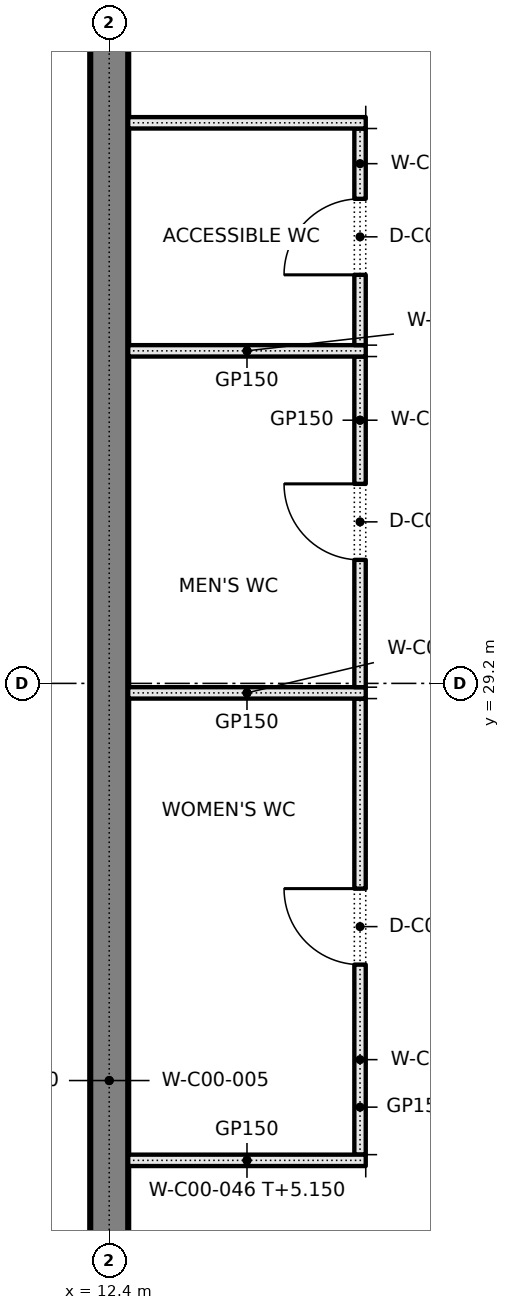
"""IFC4 building model, lengths in metres.
Left out: names, types, materials, properties, quantities, classifications, styles, units other than length and angle.
Written with IfcOpenShell. Run it as: python <this file> out.ifc"""

import sys

from ifc_helpers import new_model, si_unit, direction, frame, frame_2d, origin, place, context, subcontext, project, spatial, rectangle, extrude, element, fill, save


model = new_model("IFC4")
c1 = context("Model", 3, precision=1e-05, world=origin(), true_north=direction((0.0, 1.0)))
c2 = subcontext(c1, "Body", "Model", "MODEL_VIEW")
j1 = project(units=[si_unit("LENGTHUNIT", "METRE"), si_unit("PLANEANGLEUNIT", "RADIAN")], contexts=[c1])
p1 = place(None, origin())
s1 = spatial("IfcSite", under=j1, at=p1, CompositionType="ELEMENT")
p2 = place(p1, origin())
s2 = spatial("IfcBuilding", under=s1, at=p2, CompositionType="ELEMENT")
p3 = place(p2, origin())
s3 = spatial("IfcBuildingStorey", under=s2, at=p3, CompositionType="ELEMENT", Elevation=0.0)
p4 = place(p3, frame((12.4, 3.75, 0.0), z_axis=(0.0, 0.0, 1.0), x_axis=(0.0, 1.0, 0.0)))
e1 = element("IfcWall", 1, at=p4, inside=s3, PredefinedType="SOLIDWALL", context=c2, shape_type="SweptSolid", body=[
    extrude(rectangle(XDim=42.5, YDim=0.5, at=frame_2d((21.25, 0.0))), origin(), (0.0, 0.0, 1.0), 5.4),
])
p5 = place(p4, frame((40.45, 0.0, 0.0)))
e2 = element("IfcOpeningElement", 2, at=p5, cuts=e1, PredefinedType="OPENING", context=c2, shape_type="SweptSolid", body=[
    extrude(rectangle(XDim=1.5, YDim=2.1, at=frame_2d((0.75, 1.05))), frame((0.0, 0.26, 0.0), z_axis=(0.0, -1.0, 0.0), x_axis=(1.0, 0.0, 0.0)), (0.0, 0.0, 1.0), 0.52),
])
p6 = place(p3, frame((12.4, 3.77, -0.41), z_axis=(0.0, 0.0, 1.0), x_axis=(0.0, 1.0, 0.0)))
e3 = element("IfcWall", 3, at=p6, inside=s3, PredefinedType="SOLIDWALL", context=c2, shape_type="SweptSolid", body=[
    extrude(rectangle(XDim=42.46, YDim=0.5, at=frame_2d((21.23, 0.0))), origin(), (0.0, 0.0, 1.0), 0.41),
])
p7 = place(p3, frame((15.7, 23.0, 0.0), z_axis=(0.0, 0.0, 1.0), x_axis=(0.0, 1.0, 0.0)))
e4 = element("IfcWall", 4, at=p7, inside=s3, PredefinedType="PARTITIONING", context=c2, shape_type="SweptSolid", body=[
    extrude(rectangle(XDim=6.0, YDim=0.15, at=frame_2d((3.0, 0.0))), origin(), (0.0, 0.0, 1.0), 5.15),
])
p8 = place(p7, frame((2.5, 0.0, 0.0)))
e5 = element("IfcOpeningElement", 5, at=p8, cuts=e4, PredefinedType="OPENING", context=c2, shape_type="SweptSolid", body=[
    extrude(rectangle(XDim=1.0, YDim=2.1, at=frame_2d((0.5, 1.05))), frame((0.0, 0.085, 0.0), z_axis=(0.0, -1.0, 0.0), x_axis=(1.0, 0.0, 0.0)), (0.0, 0.0, 1.0), 0.17),
])
for number, where, z_axis, x_axis in (
    (6, (12.65, 22.925, 0.0), (0.0, 0.0, 1.0), (1.0, 0.0, 0.0)),
    (7, (12.65, 29.075, 0.0), (0.0, 0.0, 1.0), (1.0, 0.0, 0.0)),
):
    element("IfcWall", number, at=place(p3, frame(where, z_axis=z_axis, x_axis=x_axis)), inside=s3, PredefinedType="PARTITIONING", context=c2, shape_type="SweptSolid", body=[
        extrude(rectangle(XDim=3.125, YDim=0.15, at=frame_2d((1.562, 0.0))), origin(), (0.0, 0.0, 1.0), 5.15),
    ])
p9 = place(p3, frame((15.7, 29.15, 0.0), z_axis=(0.0, 0.0, 1.0), x_axis=(0.0, 1.0, 0.0)))
e8 = element("IfcWall", 8, at=p9, inside=s3, PredefinedType="PARTITIONING", context=c2, shape_type="SweptSolid", body=[
    extrude(rectangle(XDim=4.35, YDim=0.15, at=frame_2d((2.175, 0.0))), origin(), (0.0, 0.0, 1.0), 5.15),
])
p10 = place(p9, frame((1.675, 0.0, 0.0)))
e9 = element("IfcOpeningElement", 9, at=p10, cuts=e8, PredefinedType="OPENING", context=c2, shape_type="SweptSolid", body=[
    extrude(rectangle(XDim=1.0, YDim=2.1, at=frame_2d((0.5, 1.05))), frame((0.0, 0.085, 0.0), z_axis=(0.0, -1.0, 0.0), x_axis=(1.0, 0.0, 0.0)), (0.0, 0.0, 1.0), 0.17),
])
p11 = place(p3, frame((12.65, 33.575, 0.0), z_axis=(0.0, 0.0, 1.0), x_axis=(1.0, 0.0, 0.0)))
e10 = element("IfcWall", 10, at=p11, inside=s3, PredefinedType="PARTITIONING", context=c2, shape_type="SweptSolid", body=[
    extrude(rectangle(XDim=3.125, YDim=0.15, at=frame_2d((1.562, 0.0))), origin(), (0.0, 0.0, 1.0), 5.15),
])
p12 = place(p3, frame((15.7, 33.65, 0.0), z_axis=(0.0, 0.0, 1.0), x_axis=(0.0, 1.0, 0.0)))
e11 = element("IfcWall", 11, at=p12, inside=s3, PredefinedType="PARTITIONING", context=c2, shape_type="SweptSolid", body=[
    extrude(rectangle(XDim=2.85, YDim=0.15, at=frame_2d((1.425, 0.0))), origin(), (0.0, 0.0, 1.0), 5.15),
])
p13 = place(p12, frame((0.925, 0.0, 0.0)))
e12 = element("IfcOpeningElement", 12, at=p13, cuts=e11, PredefinedType="OPENING", context=c2, shape_type="SweptSolid", body=[
    extrude(rectangle(XDim=1.0, YDim=2.1, at=frame_2d((0.5, 1.05))), frame((0.0, 0.085, 0.0), z_axis=(0.0, -1.0, 0.0), x_axis=(1.0, 0.0, 0.0)), (0.0, 0.0, 1.0), 0.17),
])
p14 = place(p3, frame((12.65, 36.575, 0.0), z_axis=(0.0, 0.0, 1.0), x_axis=(1.0, 0.0, 0.0)))
e13 = element("IfcWall", 13, at=p14, inside=s3, PredefinedType="PARTITIONING", context=c2, shape_type="SweptSolid", body=[
    extrude(rectangle(XDim=3.125, YDim=0.15, at=frame_2d((1.562, 0.0))), origin(), (0.0, 0.0, 1.0), 5.15),
])
p15 = place(p8, origin())
e14 = element("IfcDoor", 14, at=p15, inside=s3, OperationType="SINGLE_SWING_RIGHT", PredefinedType="DOOR", context=c2, shape_type="SweptSolid", body=[
    extrude(rectangle(XDim=1.0, YDim=2.1, at=frame_2d((0.5, 1.05))), frame((0.0, 0.025, 0.0), z_axis=(0.0, -1.0, 0.0), x_axis=(1.0, 0.0, 0.0)), (0.0, 0.0, 1.0), 0.05),
])
fill(e5, e14)
p16 = place(p10, origin())
e15 = element("IfcDoor", 15, at=p16, inside=s3, OperationType="SINGLE_SWING_RIGHT", PredefinedType="DOOR", context=c2, shape_type="SweptSolid", body=[
    extrude(rectangle(XDim=1.0, YDim=2.1, at=frame_2d((0.5, 1.05))), frame((0.0, 0.025, 0.0), z_axis=(0.0, -1.0, 0.0), x_axis=(1.0, 0.0, 0.0)), (0.0, 0.0, 1.0), 0.05),
])
fill(e9, e15)
p17 = place(p13, origin())
e16 = element("IfcDoor", 16, at=p17, inside=s3, OperationType="SINGLE_SWING_LEFT", PredefinedType="DOOR", context=c2, shape_type="SweptSolid", body=[
    extrude(rectangle(XDim=1.0, YDim=2.1, at=frame_2d((0.5, 1.05))), frame((0.0, 0.025, 0.0), z_axis=(0.0, -1.0, 0.0), x_axis=(1.0, 0.0, 0.0)), (0.0, 0.0, 1.0), 0.05),
])
fill(e12, e16)
save(model, sys.argv[1])
